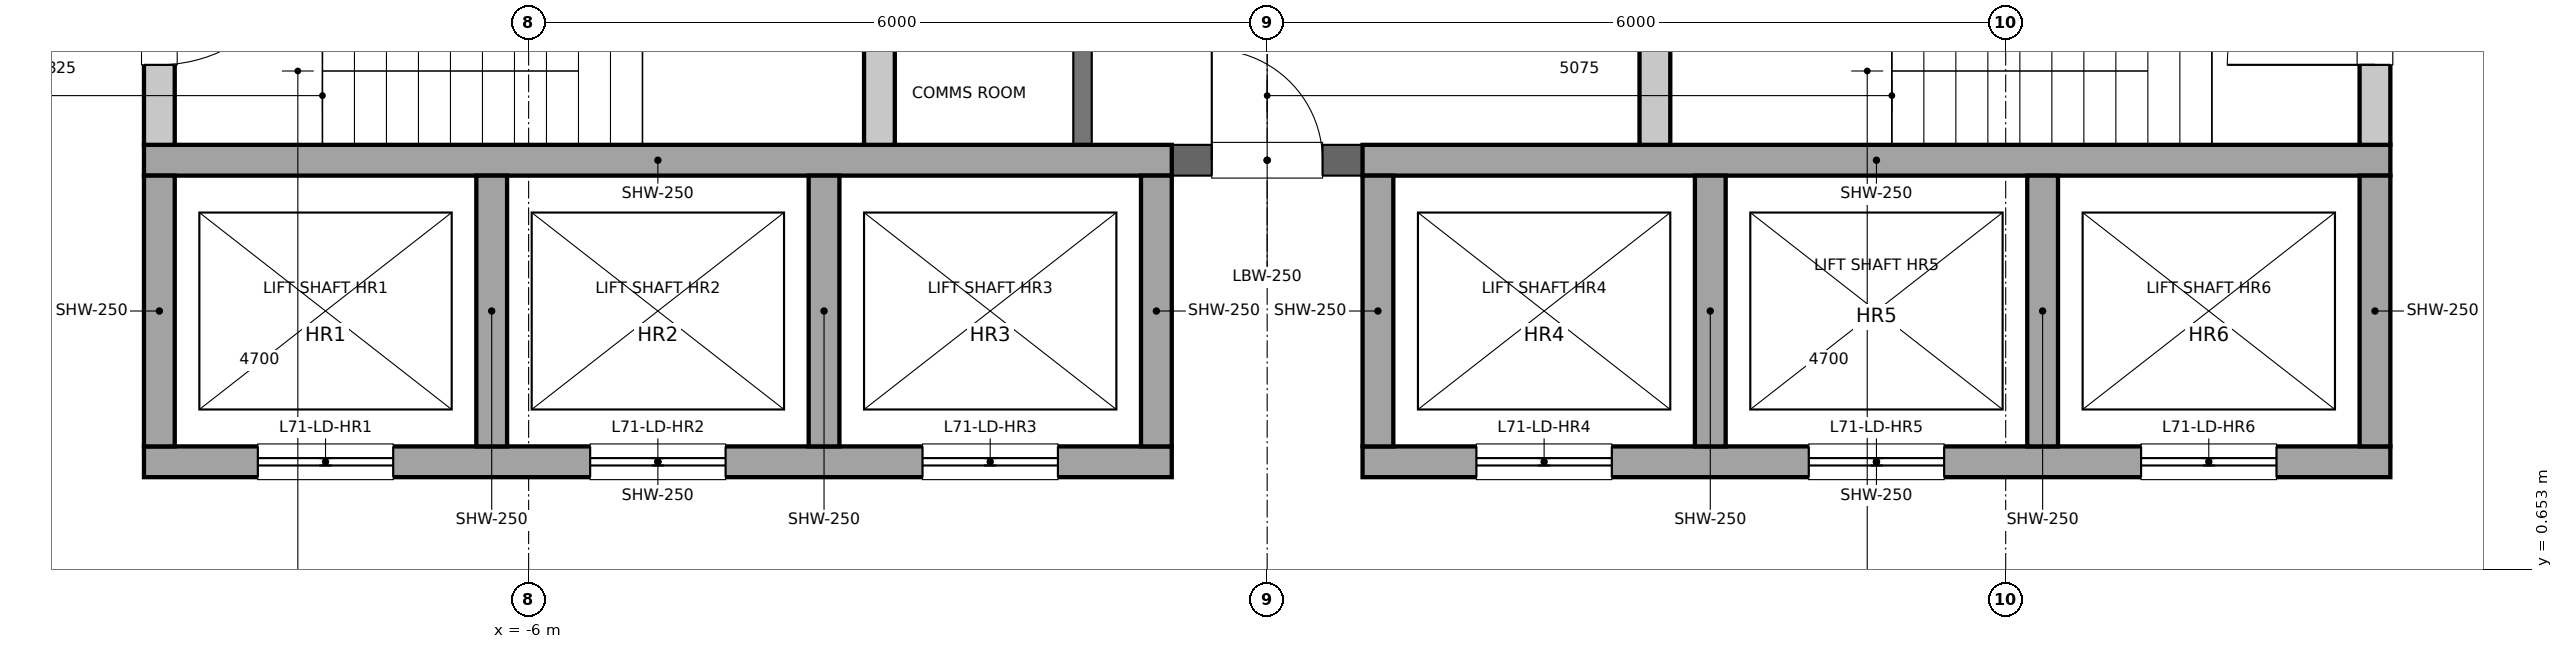
"""IFC4 building model, lengths in metres.
Left out: names, types, materials, properties, quantities, classifications, styles, units other than length and angle.
Written with IfcOpenShell. Run it as: python <this file> out.ifc"""

import sys

from ifc_helpers import new_model, si_unit, direction, frame, frame_2d, origin, place, context, subcontext, project, spatial, rectangle, extrude, element, fill, save


model = new_model("IFC4")
c1 = context("Model", 3, precision=1e-05, world=origin(), true_north=direction((0.0, 1.0)))
c2 = subcontext(c1, "Body", "Model", "MODEL_VIEW")
j1 = project(units=[si_unit("LENGTHUNIT", "METRE"), si_unit("PLANEANGLEUNIT", "RADIAN")], contexts=[c1])
p1 = place(None, origin())
s1 = spatial("IfcSite", under=j1, at=p1, CompositionType="ELEMENT")
p2 = place(p1, origin())
s2 = spatial("IfcBuilding", under=s1, at=p2, CompositionType="ELEMENT")
p3 = place(p2, frame((0.0, 0.0, 320.4)))
s3 = spatial("IfcBuildingStorey", under=s2, at=p3, CompositionType="ELEMENT", Elevation=320.4)
p4 = place(p3, frame((-1.5, 4.1, 0.0), z_axis=(0.0, 0.0, 1.0), x_axis=(0.0, 1.0, 0.0)))
e1 = element("IfcWall", 1, at=p4, inside=s3, PredefinedType="PARTITIONING", context=c2, shape_type="SweptSolid", body=[
    extrude(rectangle(XDim=2.5, YDim=0.15, at=frame_2d((1.25, 0.0))), origin(), (0.0, 0.0, 1.0), 3.85),
])
p5 = place(p4, frame((0.8, 0.0, 0.0)))
e2 = element("IfcOpeningElement", 2, at=p5, cuts=e1, PredefinedType="OPENING", context=c2, shape_type="SweptSolid", body=[
    extrude(rectangle(XDim=0.9, YDim=2.1, at=frame_2d((0.45, 1.05))), frame((0.0, 0.075, 0.0), z_axis=(0.0, -1.0, 0.0), x_axis=(1.0, 0.0, 0.0)), (0.0, 0.0, 1.0), 0.15),
])
p6 = place(p3, frame((-9.0, 4.1, 0.0), z_axis=(0.0, 0.0, 1.0), x_axis=(0.0, 1.0, 0.0)))
e3 = element("IfcWall", 3, at=p6, inside=s3, PredefinedType="SOLIDWALL", context=c2, shape_type="SweptSolid", body=[
    extrude(rectangle(XDim=2.5, YDim=0.25, at=frame_2d((1.25, 0.0))), origin(), (0.0, 0.0, 1.0), 3.85),
])
p7 = place(p6, frame((0.65, 0.0, 0.0)))
e4 = element("IfcOpeningElement", 4, at=p7, cuts=e3, PredefinedType="OPENING", context=c2, shape_type="SweptSolid", body=[
    extrude(rectangle(XDim=1.2, YDim=2.1, at=frame_2d((0.6, 1.05))), frame((0.0, 0.125, 0.0), z_axis=(0.0, -1.0, 0.0), x_axis=(1.0, 0.0, 0.0)), (0.0, 0.0, 1.0), 0.25),
])
p8 = place(p3, frame((9.0, 4.1, 0.0), z_axis=(0.0, 0.0, 1.0), x_axis=(0.0, 1.0, 0.0)))
e5 = element("IfcWall", 5, at=p8, inside=s3, PredefinedType="SOLIDWALL", context=c2, shape_type="SweptSolid", body=[
    extrude(rectangle(XDim=2.5, YDim=0.25, at=frame_2d((1.25, 0.0))), origin(), (0.0, 0.0, 1.0), 3.85),
])
p9 = place(p8, frame((0.65, 0.0, 0.0)))
e6 = element("IfcOpeningElement", 6, at=p9, cuts=e5, PredefinedType="OPENING", context=c2, shape_type="SweptSolid", body=[
    extrude(rectangle(XDim=1.2, YDim=2.1, at=frame_2d((0.6, 1.05))), frame((0.0, 0.125, 0.0), z_axis=(0.0, -1.0, 0.0), x_axis=(1.0, 0.0, 0.0)), (0.0, 0.0, 1.0), 0.25),
])
for number, where, z_axis, x_axis in (
    (7, (-3.15, 4.1, 0.0), (0.0, 0.0, 1.0), (0.0, 1.0, 0.0)),
    (8, (3.15, 4.1, 0.0), (0.0, 0.0, 1.0), (0.0, 1.0, 0.0)),
):
    element("IfcWall", number, at=place(p3, frame(where, z_axis=z_axis, x_axis=x_axis)), inside=s3, PredefinedType="SOLIDWALL", context=c2, shape_type="SweptSolid", body=[
        extrude(rectangle(XDim=2.5, YDim=0.25, at=frame_2d((1.25, 0.0))), origin(), (0.0, 0.0, 1.0), 3.85),
    ])
p10 = place(p3, frame((-0.775, 3.975, 0.0), z_axis=(0.0, 0.0, 1.0), x_axis=(1.0, 0.0, 0.0)))
e9 = element("IfcWall", 9, at=p10, inside=s3, PredefinedType="PARTITIONING", context=c2, shape_type="SweptSolid", body=[
    extrude(rectangle(XDim=1.55, YDim=0.25, at=frame_2d((0.775, 0.0))), origin(), (0.0, 0.0, 1.0), 3.85),
])
p11 = place(p10, frame((0.325, 0.0, 0.0)))
e10 = element("IfcOpeningElement", 10, at=p11, cuts=e9, PredefinedType="OPENING", context=c2, shape_type="SweptSolid", body=[
    extrude(rectangle(XDim=0.9, YDim=2.1, at=frame_2d((0.45, 1.05))), frame((0.0, 0.125, 0.0), z_axis=(0.0, -1.0, 0.0), x_axis=(1.0, 0.0, 0.0)), (0.0, 0.0, 1.0), 0.25),
])
p12 = place(p3, frame((-9.125, 1.525, 0.0), z_axis=(0.0, 0.0, 1.0), x_axis=(1.0, 0.0, 0.0)))
e11 = element("IfcWall", 11, at=p12, inside=s3, PredefinedType="SOLIDWALL", context=c2, shape_type="SweptSolid", body=[
    extrude(rectangle(XDim=8.35, YDim=0.25, at=frame_2d((4.175, 0.0))), origin(), (0.0, 0.0, 1.0), 3.85),
])
p13 = place(p12, frame((0.925, 0.0, 0.0)))
e12 = element("IfcOpeningElement", 12, at=p13, cuts=e11, PredefinedType="OPENING", context=c2, shape_type="SweptSolid", body=[
    extrude(rectangle(XDim=1.1, YDim=2.1, at=frame_2d((0.55, 1.05))), frame((0.0, 0.125, 0.0), z_axis=(0.0, -1.0, 0.0), x_axis=(1.0, 0.0, 0.0)), (0.0, 0.0, 1.0), 0.25),
])
p14 = place(p12, frame((3.625, 0.0, 0.0)))
e13 = element("IfcOpeningElement", 13, at=p14, cuts=e11, PredefinedType="OPENING", context=c2, shape_type="SweptSolid", body=[
    extrude(rectangle(XDim=1.1, YDim=2.1, at=frame_2d((0.55, 1.05))), frame((0.0, 0.125, 0.0), z_axis=(0.0, -1.0, 0.0), x_axis=(1.0, 0.0, 0.0)), (0.0, 0.0, 1.0), 0.25),
])
p15 = place(p12, frame((6.325, 0.0, 0.0)))
e14 = element("IfcOpeningElement", 14, at=p15, cuts=e11, PredefinedType="OPENING", context=c2, shape_type="SweptSolid", body=[
    extrude(rectangle(XDim=1.1, YDim=2.1, at=frame_2d((0.55, 1.05))), frame((0.0, 0.125, 0.0), z_axis=(0.0, -1.0, 0.0), x_axis=(1.0, 0.0, 0.0)), (0.0, 0.0, 1.0), 0.25),
])
p16 = place(p3, frame((0.775, 1.525, 0.0), z_axis=(0.0, 0.0, 1.0), x_axis=(1.0, 0.0, 0.0)))
e15 = element("IfcWall", 15, at=p16, inside=s3, PredefinedType="SOLIDWALL", context=c2, shape_type="SweptSolid", body=[
    extrude(rectangle(XDim=8.35, YDim=0.25, at=frame_2d((4.175, 0.0))), origin(), (0.0, 0.0, 1.0), 3.85),
])
p17 = place(p16, frame((0.925, 0.0, 0.0)))
e16 = element("IfcOpeningElement", 16, at=p17, cuts=e15, PredefinedType="OPENING", context=c2, shape_type="SweptSolid", body=[
    extrude(rectangle(XDim=1.1, YDim=2.1, at=frame_2d((0.55, 1.05))), frame((0.0, 0.125, 0.0), z_axis=(0.0, -1.0, 0.0), x_axis=(1.0, 0.0, 0.0)), (0.0, 0.0, 1.0), 0.25),
])
p18 = place(p16, frame((3.625, 0.0, 0.0)))
e17 = element("IfcOpeningElement", 17, at=p18, cuts=e15, PredefinedType="OPENING", context=c2, shape_type="SweptSolid", body=[
    extrude(rectangle(XDim=1.1, YDim=2.1, at=frame_2d((0.55, 1.05))), frame((0.0, 0.125, 0.0), z_axis=(0.0, -1.0, 0.0), x_axis=(1.0, 0.0, 0.0)), (0.0, 0.0, 1.0), 0.25),
])
p19 = place(p16, frame((6.325, 0.0, 0.0)))
e18 = element("IfcOpeningElement", 18, at=p19, cuts=e15, PredefinedType="OPENING", context=c2, shape_type="SweptSolid", body=[
    extrude(rectangle(XDim=1.1, YDim=2.1, at=frame_2d((0.55, 1.05))), frame((0.0, 0.125, 0.0), z_axis=(0.0, -1.0, 0.0), x_axis=(1.0, 0.0, 0.0)), (0.0, 0.0, 1.0), 0.25),
])
for number, where, z_axis, x_axis in (
    (19, (-9.125, 3.975, 0.0), (0.0, 0.0, 1.0), (1.0, 0.0, 0.0)),
    (20, (0.775, 3.975, 0.0), (0.0, 0.0, 1.0), (1.0, 0.0, 0.0)),
):
    element("IfcWall", number, at=place(p3, frame(where, z_axis=z_axis, x_axis=x_axis)), inside=s3, PredefinedType="SOLIDWALL", context=c2, shape_type="SweptSolid", body=[
        extrude(rectangle(XDim=8.35, YDim=0.25, at=frame_2d((4.175, 0.0))), origin(), (0.0, 0.0, 1.0), 3.85),
    ])
for number, where, z_axis, x_axis in (
    (21, (-9.0, 1.65, 0.0), (0.0, 0.0, 1.0), (0.0, 1.0, 0.0)),
    (22, (9.0, 1.65, 0.0), (0.0, 0.0, 1.0), (0.0, 1.0, 0.0)),
    (23, (-6.3, 1.65, 0.0), (0.0, 0.0, 1.0), (0.0, 1.0, 0.0)),
    (24, (6.3, 1.65, 0.0), (0.0, 0.0, 1.0), (0.0, 1.0, 0.0)),
    (25, (-3.6, 1.65, 0.0), (0.0, 0.0, 1.0), (0.0, 1.0, 0.0)),
    (26, (3.6, 1.65, 0.0), (0.0, 0.0, 1.0), (0.0, 1.0, 0.0)),
    (27, (-0.9, 1.65, 0.0), (0.0, 0.0, 1.0), (0.0, 1.0, 0.0)),
    (28, (0.9, 1.65, 0.0), (0.0, 0.0, 1.0), (0.0, 1.0, 0.0)),
):
    element("IfcWall", number, at=place(p3, frame(where, z_axis=z_axis, x_axis=x_axis)), inside=s3, PredefinedType="SOLIDWALL", context=c2, shape_type="SweptSolid", body=[
        extrude(rectangle(XDim=2.2, YDim=0.25, at=frame_2d((1.1, 0.0))), origin(), (0.0, 0.0, 1.0), 3.85),
    ])
p20 = place(p13, origin())
e29 = element("IfcDoor", 29, at=p20, inside=s3, OperationType="DOUBLE_DOOR_SLIDING", PredefinedType="DOOR", context=c2, shape_type="SweptSolid", body=[
    extrude(rectangle(XDim=1.1, YDim=2.1, at=frame_2d((0.55, 1.05))), frame((0.0, 0.025, 0.0), z_axis=(0.0, -1.0, 0.0), x_axis=(1.0, 0.0, 0.0)), (0.0, 0.0, 1.0), 0.05),
])
fill(e12, e29)
p21 = place(p14, origin())
e30 = element("IfcDoor", 30, at=p21, inside=s3, OperationType="DOUBLE_DOOR_SLIDING", PredefinedType="DOOR", context=c2, shape_type="SweptSolid", body=[
    extrude(rectangle(XDim=1.1, YDim=2.1, at=frame_2d((0.55, 1.05))), frame((0.0, 0.025, 0.0), z_axis=(0.0, -1.0, 0.0), x_axis=(1.0, 0.0, 0.0)), (0.0, 0.0, 1.0), 0.05),
])
fill(e13, e30)
p22 = place(p15, origin())
e31 = element("IfcDoor", 31, at=p22, inside=s3, OperationType="DOUBLE_DOOR_SLIDING", PredefinedType="DOOR", context=c2, shape_type="SweptSolid", body=[
    extrude(rectangle(XDim=1.1, YDim=2.1, at=frame_2d((0.55, 1.05))), frame((0.0, 0.025, 0.0), z_axis=(0.0, -1.0, 0.0), x_axis=(1.0, 0.0, 0.0)), (0.0, 0.0, 1.0), 0.05),
])
fill(e14, e31)
p23 = place(p17, origin())
e32 = element("IfcDoor", 32, at=p23, inside=s3, OperationType="DOUBLE_DOOR_SLIDING", PredefinedType="DOOR", context=c2, shape_type="SweptSolid", body=[
    extrude(rectangle(XDim=1.1, YDim=2.1, at=frame_2d((0.55, 1.05))), frame((0.0, 0.025, 0.0), z_axis=(0.0, -1.0, 0.0), x_axis=(1.0, 0.0, 0.0)), (0.0, 0.0, 1.0), 0.05),
])
fill(e16, e32)
p24 = place(p18, origin())
e33 = element("IfcDoor", 33, at=p24, inside=s3, OperationType="DOUBLE_DOOR_SLIDING", PredefinedType="DOOR", context=c2, shape_type="SweptSolid", body=[
    extrude(rectangle(XDim=1.1, YDim=2.1, at=frame_2d((0.55, 1.05))), frame((0.0, 0.025, 0.0), z_axis=(0.0, -1.0, 0.0), x_axis=(1.0, 0.0, 0.0)), (0.0, 0.0, 1.0), 0.05),
])
fill(e17, e33)
p25 = place(p19, origin())
e34 = element("IfcDoor", 34, at=p25, inside=s3, OperationType="DOUBLE_DOOR_SLIDING", PredefinedType="DOOR", context=c2, shape_type="SweptSolid", body=[
    extrude(rectangle(XDim=1.1, YDim=2.1, at=frame_2d((0.55, 1.05))), frame((0.0, 0.025, 0.0), z_axis=(0.0, -1.0, 0.0), x_axis=(1.0, 0.0, 0.0)), (0.0, 0.0, 1.0), 0.05),
])
fill(e18, e34)
p26 = place(p7, origin())
e35 = element("IfcDoor", 35, at=p26, inside=s3, OperationType="SINGLE_SWING_RIGHT", PredefinedType="DOOR", context=c2, shape_type="SweptSolid", body=[
    extrude(rectangle(XDim=1.2, YDim=2.1, at=frame_2d((0.6, 1.05))), frame((0.0, 0.025, 0.0), z_axis=(0.0, -1.0, 0.0), x_axis=(1.0, 0.0, 0.0)), (0.0, 0.0, 1.0), 0.05),
])
fill(e4, e35)
p27 = place(p9, origin())
e36 = element("IfcDoor", 36, at=p27, inside=s3, OperationType="SINGLE_SWING_LEFT", PredefinedType="DOOR", context=c2, shape_type="SweptSolid", body=[
    extrude(rectangle(XDim=1.2, YDim=2.1, at=frame_2d((0.6, 1.05))), frame((0.0, 0.025, 0.0), z_axis=(0.0, -1.0, 0.0), x_axis=(1.0, 0.0, 0.0)), (0.0, 0.0, 1.0), 0.05),
])
fill(e6, e36)
p28 = place(p11, origin())
e37 = element("IfcDoor", 37, at=p28, inside=s3, OperationType="SINGLE_SWING_LEFT", PredefinedType="DOOR", context=c2, shape_type="SweptSolid", body=[
    extrude(rectangle(XDim=0.9, YDim=2.1, at=frame_2d((0.45, 1.05))), frame((0.0, 0.025, 0.0), z_axis=(0.0, -1.0, 0.0), x_axis=(1.0, 0.0, 0.0)), (0.0, 0.0, 1.0), 0.05),
])
fill(e10, e37)
save(model, sys.argv[1])
